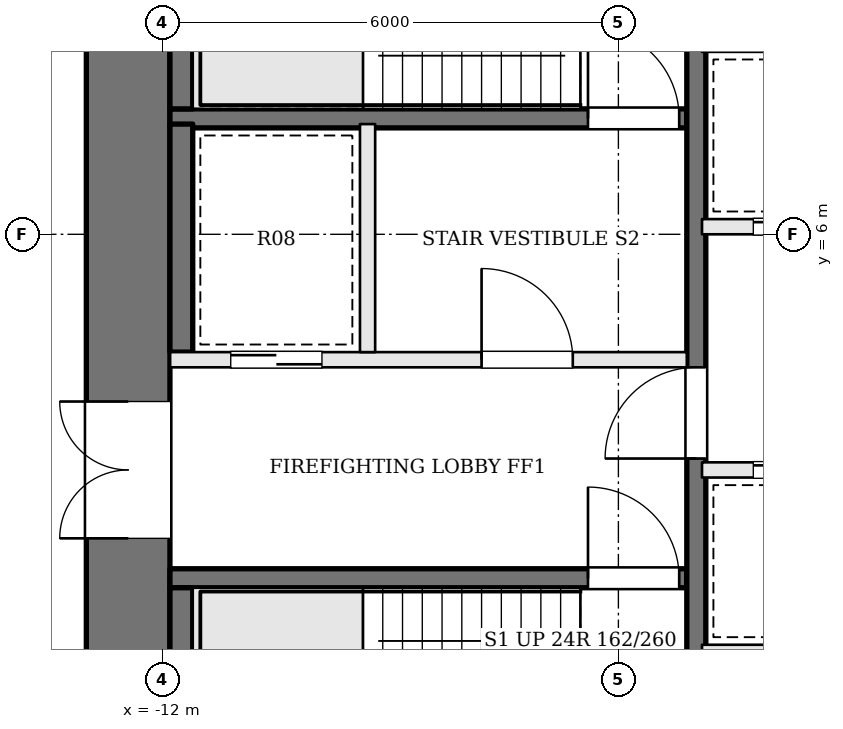
"""IFC4 building model, lengths in metres.
Left out: names, types, materials, properties, quantities, classifications, styles, units other than length and angle.
Written with IfcOpenShell. Run it as: python <this file> out.ifc"""

import sys

from ifc_helpers import new_model, si_unit, direction, frame, frame_2d, origin, place, context, subcontext, project, spatial, rectangle, extrude, element, fill, save


model = new_model("IFC4")
c1 = context("Model", 3, precision=1e-05, world=origin(), true_north=direction((0.0, 1.0)))
c2 = subcontext(c1, "Body", "Model", "MODEL_VIEW")
j1 = project(units=[si_unit("LENGTHUNIT", "METRE"), si_unit("PLANEANGLEUNIT", "RADIAN")], contexts=[c1])
p1 = place(None, origin())
s1 = spatial("IfcSite", under=j1, at=p1, CompositionType="ELEMENT")
p2 = place(p1, origin())
s2 = spatial("IfcBuilding", under=s1, at=p2, CompositionType="ELEMENT")
p3 = place(p2, frame((0.0, 0.0, 134.4)))
s3 = spatial("IfcBuildingStorey", under=s2, at=p3, CompositionType="ELEMENT", Elevation=134.4)
p4 = place(p3, frame((-12.45, -1.9, 0.0), z_axis=(0.0, 0.0, 1.0), x_axis=(0.0, 1.0, 0.0)))
e1 = element("IfcWall", 1, at=p4, inside=s3, PredefinedType="SHEAR", context=c2, shape_type="SweptSolid", body=[
    extrude(rectangle(XDim=12.8, YDim=1.1, at=frame_2d((6.4, 0.0))), origin(), (0.0, 0.0, 1.0), 3.9),
])
p5 = place(p4, frame((3.9, 0.0, 0.0)))
e2 = element("IfcOpeningElement", 2, at=p5, cuts=e1, PredefinedType="OPENING", context=c2, shape_type="SweptSolid", body=[
    extrude(rectangle(XDim=1.8, YDim=2.1, at=frame_2d((0.9, 1.05))), frame((0.0, 0.56, 0.0), z_axis=(0.0, -1.0, 0.0), x_axis=(1.0, 0.0, 0.0)), (0.0, 0.0, 1.0), 1.12),
])
p6 = place(p3, frame((-11.9, 1.475, 0.0), z_axis=(0.0, 0.0, 1.0), x_axis=(1.0, 0.0, 0.0)))
e3 = element("IfcWall", 3, at=p6, inside=s3, PredefinedType="SOLIDWALL", context=c2, shape_type="SweptSolid", body=[
    extrude(rectangle(XDim=6.8, YDim=0.25, at=frame_2d((3.4, 0.0))), origin(), (0.0, 0.0, 1.0), 3.7),
])
p7 = place(p6, frame((5.5, 0.0, 0.0)))
e4 = element("IfcOpeningElement", 4, at=p7, cuts=e3, PredefinedType="OPENING", context=c2, shape_type="SweptSolid", body=[
    extrude(rectangle(XDim=1.2, YDim=2.1, at=frame_2d((0.6, 1.05))), frame((0.0, 0.135, 0.0), z_axis=(0.0, -1.0, 0.0), x_axis=(1.0, 0.0, 0.0)), (0.0, 0.0, 1.0), 0.27),
])
p8 = place(p3, frame((-11.9, 4.35, 0.0), z_axis=(0.0, 0.0, 1.0), x_axis=(1.0, 0.0, 0.0)))
e5 = element("IfcWall", 5, at=p8, inside=s3, PredefinedType="SOLIDWALL", context=c2, shape_type="SweptSolid", body=[
    extrude(rectangle(XDim=6.8, YDim=0.2, at=frame_2d((3.4, 0.0))), origin(), (0.0, 0.0, 1.0), 3.7),
])
p9 = place(p8, frame((4.1, 0.0, 0.0)))
e6 = element("IfcOpeningElement", 6, at=p9, cuts=e5, PredefinedType="OPENING", context=c2, shape_type="SweptSolid", body=[
    extrude(rectangle(XDim=1.2, YDim=2.1, at=frame_2d((0.6, 1.05))), frame((0.0, 0.11, 0.0), z_axis=(0.0, -1.0, 0.0), x_axis=(1.0, 0.0, 0.0)), (0.0, 0.0, 1.0), 0.22),
])
p10 = place(p8, frame((0.8, 0.0, 0.0)))
e7 = element("IfcOpeningElement", 7, at=p10, cuts=e5, PredefinedType="OPENING", context=c2, shape_type="SweptSolid", body=[
    extrude(rectangle(XDim=1.2, YDim=2.1, at=frame_2d((0.6, 1.05))), frame((0.0, 0.11, 0.0), z_axis=(0.0, -1.0, 0.0), x_axis=(1.0, 0.0, 0.0)), (0.0, 0.0, 1.0), 0.22),
])
p11 = place(p3, frame((-11.9, 7.525, 0.0), z_axis=(0.0, 0.0, 1.0), x_axis=(1.0, 0.0, 0.0)))
e8 = element("IfcWall", 8, at=p11, inside=s3, PredefinedType="SOLIDWALL", context=c2, shape_type="SweptSolid", body=[
    extrude(rectangle(XDim=6.8, YDim=0.25, at=frame_2d((3.4, 0.0))), origin(), (0.0, 0.0, 1.0), 3.7),
])
p12 = place(p11, frame((5.5, 0.0, 0.0)))
e9 = element("IfcOpeningElement", 9, at=p12, cuts=e8, PredefinedType="OPENING", context=c2, shape_type="SweptSolid", body=[
    extrude(rectangle(XDim=1.2, YDim=2.1, at=frame_2d((0.6, 1.05))), frame((0.0, 0.135, 0.0), z_axis=(0.0, -1.0, 0.0), x_axis=(1.0, 0.0, 0.0)), (0.0, 0.0, 1.0), 0.27),
])
p13 = place(p3, frame((-9.3, 4.45, 0.0), z_axis=(0.0, 0.0, 1.0), x_axis=(0.0, 1.0, 0.0)))
e10 = element("IfcWall", 10, at=p13, inside=s3, PredefinedType="SOLIDWALL", context=c2, shape_type="SweptSolid", body=[
    extrude(rectangle(XDim=3.0, YDim=0.2, at=frame_2d((1.5, 0.0))), origin(), (0.0, 0.0, 1.0), 3.7),
])
p14 = place(p3, frame((-4.975, -1.9, 0.0), z_axis=(0.0, 0.0, 1.0), x_axis=(0.0, 1.0, 0.0)))
e11 = element("IfcWall", 11, at=p14, inside=s3, PredefinedType="SOLIDWALL", context=c2, shape_type="SweptSolid", body=[
    extrude(rectangle(XDim=12.8, YDim=0.25, at=frame_2d((6.4, 0.0))), origin(), (0.0, 0.0, 1.0), 3.7),
])
p15 = place(p14, frame((4.95, 0.0, 0.0)))
e12 = element("IfcOpeningElement", 12, at=p15, cuts=e11, PredefinedType="OPENING", context=c2, shape_type="SweptSolid", body=[
    extrude(rectangle(XDim=1.2, YDim=2.1, at=frame_2d((0.6, 1.05))), frame((0.0, 0.135, 0.0), z_axis=(0.0, -1.0, 0.0), x_axis=(1.0, 0.0, 0.0)), (0.0, 0.0, 1.0), 0.27),
])
p16 = place(p3, frame((-11.75, -1.6, 0.0), z_axis=(0.0, 0.0, 1.0), x_axis=(0.0, 1.0, 0.0)))
e13 = element("IfcWall", 13, at=p16, inside=s3, PredefinedType="SOLIDWALL", context=c2, shape_type="SweptSolid", body=[
    extrude(rectangle(XDim=2.95, YDim=0.3, at=frame_2d((1.475, 0.0))), origin(), (0.0, 0.0, 1.0), 3.7),
])
p17 = place(p3, frame((-11.75, 4.45, 0.0), z_axis=(0.0, 0.0, 1.0), x_axis=(0.0, 1.0, 0.0)))
e14 = element("IfcWall", 14, at=p17, inside=s3, PredefinedType="SOLIDWALL", context=c2, shape_type="SweptSolid", body=[
    extrude(rectangle(XDim=3.0, YDim=0.3, at=frame_2d((1.5, 0.0))), origin(), (0.0, 0.0, 1.0), 3.7),
])
p18 = place(p3, frame((-11.75, 7.65, 0.0), z_axis=(0.0, 0.0, 1.0), x_axis=(0.0, 1.0, 0.0)))
e15 = element("IfcWall", 15, at=p18, inside=s3, PredefinedType="SOLIDWALL", context=c2, shape_type="SweptSolid", body=[
    extrude(rectangle(XDim=2.95, YDim=0.3, at=frame_2d((1.475, 0.0))), origin(), (0.0, 0.0, 1.0), 3.7),
])
p19 = place(p3, frame((-4.9, 0.5, 0.0), z_axis=(0.0, 0.0, 1.0), x_axis=(1.0, 0.0, 0.0)))
e16 = element("IfcWall", 16, at=p19, inside=s3, PredefinedType="SOLIDWALL", context=c2, shape_type="SweptSolid", body=[
    extrude(rectangle(XDim=9.8, YDim=0.2, at=frame_2d((4.9, 0.0))), origin(), (0.0, 0.0, 1.0), 3.7),
])
p20 = place(p3, frame((-4.9, 2.9, 0.0), z_axis=(0.0, 0.0, 1.0), x_axis=(1.0, 0.0, 0.0)))
e17 = element("IfcWall", 17, at=p20, inside=s3, PredefinedType="SOLIDWALL", context=c2, shape_type="SweptSolid", body=[
    extrude(rectangle(XDim=9.8, YDim=0.2, at=frame_2d((4.9, 0.0))), origin(), (0.0, 0.0, 1.0), 3.7),
])
p21 = place(p20, frame((0.675, 0.0, 0.0)))
e18 = element("IfcOpeningElement", 18, at=p21, cuts=e17, PredefinedType="OPENING", context=c2, shape_type="SweptSolid", body=[
    extrude(rectangle(XDim=1.1, YDim=2.1, at=frame_2d((0.55, 1.05))), frame((0.0, 0.11, 0.0), z_axis=(0.0, -1.0, 0.0), x_axis=(1.0, 0.0, 0.0)), (0.0, 0.0, 1.0), 0.22),
])
p22 = place(p20, frame((2.613, 0.0, 0.0)))
e19 = element("IfcOpeningElement", 19, at=p22, cuts=e17, PredefinedType="OPENING", context=c2, shape_type="SweptSolid", body=[
    extrude(rectangle(XDim=0.9, YDim=2.1, at=frame_2d((0.45, 1.05))), frame((0.0, 0.11, 0.0), z_axis=(0.0, -1.0, 0.0), x_axis=(1.0, 0.0, 0.0)), (0.0, 0.0, 1.0), 0.22),
])
p23 = place(p20, frame((4.35, 0.0, 0.0)))
e20 = element("IfcOpeningElement", 20, at=p23, cuts=e17, PredefinedType="OPENING", context=c2, shape_type="SweptSolid", body=[
    extrude(rectangle(XDim=1.1, YDim=2.1, at=frame_2d((0.55, 1.05))), frame((0.0, 0.11, 0.0), z_axis=(0.0, -1.0, 0.0), x_axis=(1.0, 0.0, 0.0)), (0.0, 0.0, 1.0), 0.22),
])
p24 = place(p20, frame((7.463, 0.0, 0.0)))
e21 = element("IfcOpeningElement", 21, at=p24, cuts=e17, PredefinedType="OPENING", context=c2, shape_type="SweptSolid", body=[
    extrude(rectangle(XDim=1.0, YDim=2.1, at=frame_2d((0.5, 1.05))), frame((0.0, 0.11, 0.0), z_axis=(0.0, -1.0, 0.0), x_axis=(1.0, 0.0, 0.0)), (0.0, 0.0, 1.0), 0.22),
])
p25 = place(p3, frame((-4.9, 6.1, 0.0), z_axis=(0.0, 0.0, 1.0), x_axis=(1.0, 0.0, 0.0)))
e22 = element("IfcWall", 22, at=p25, inside=s3, PredefinedType="SOLIDWALL", context=c2, shape_type="SweptSolid", body=[
    extrude(rectangle(XDim=9.8, YDim=0.2, at=frame_2d((4.9, 0.0))), origin(), (0.0, 0.0, 1.0), 3.7),
])
p26 = place(p25, frame((0.675, 0.0, 0.0)))
e23 = element("IfcOpeningElement", 23, at=p26, cuts=e22, PredefinedType="OPENING", context=c2, shape_type="SweptSolid", body=[
    extrude(rectangle(XDim=1.1, YDim=2.1, at=frame_2d((0.55, 1.05))), frame((0.0, 0.11, 0.0), z_axis=(0.0, -1.0, 0.0), x_axis=(1.0, 0.0, 0.0)), (0.0, 0.0, 1.0), 0.22),
])
p27 = place(p25, frame((3.125, 0.0, 0.0)))
e24 = element("IfcOpeningElement", 24, at=p27, cuts=e22, PredefinedType="OPENING", context=c2, shape_type="SweptSolid", body=[
    extrude(rectangle(XDim=1.1, YDim=2.1, at=frame_2d((0.55, 1.05))), frame((0.0, 0.11, 0.0), z_axis=(0.0, -1.0, 0.0), x_axis=(1.0, 0.0, 0.0)), (0.0, 0.0, 1.0), 0.22),
])
p28 = place(p25, frame((5.575, 0.0, 0.0)))
e25 = element("IfcOpeningElement", 25, at=p28, cuts=e22, PredefinedType="OPENING", context=c2, shape_type="SweptSolid", body=[
    extrude(rectangle(XDim=1.1, YDim=2.1, at=frame_2d((0.55, 1.05))), frame((0.0, 0.11, 0.0), z_axis=(0.0, -1.0, 0.0), x_axis=(1.0, 0.0, 0.0)), (0.0, 0.0, 1.0), 0.22),
])
p29 = place(p25, frame((8.025, 0.0, 0.0)))
e26 = element("IfcOpeningElement", 26, at=p29, cuts=e22, PredefinedType="OPENING", context=c2, shape_type="SweptSolid", body=[
    extrude(rectangle(XDim=1.1, YDim=2.1, at=frame_2d((0.55, 1.05))), frame((0.0, 0.11, 0.0), z_axis=(0.0, -1.0, 0.0), x_axis=(1.0, 0.0, 0.0)), (0.0, 0.0, 1.0), 0.22),
])
p30 = place(p5, origin())
e27 = element("IfcDoor", 27, at=p30, inside=s3, OperationType="DOUBLE_DOOR_SINGLE_SWING", PredefinedType="DOOR", context=c2, shape_type="SweptSolid", body=[
    extrude(rectangle(XDim=1.8, YDim=2.1, at=frame_2d((0.9, 1.05))), frame((0.0, 0.025, 0.0), z_axis=(0.0, -1.0, 0.0), x_axis=(1.0, 0.0, 0.0)), (0.0, 0.0, 1.0), 0.05),
])
fill(e2, e27)
p31 = place(p15, origin())
e28 = element("IfcDoor", 28, at=p31, inside=s3, OperationType="SINGLE_SWING_LEFT", PredefinedType="DOOR", context=c2, shape_type="SweptSolid", body=[
    extrude(rectangle(XDim=1.2, YDim=2.1, at=frame_2d((0.6, 1.05))), frame((0.0, 0.025, 0.0), z_axis=(0.0, -1.0, 0.0), x_axis=(1.0, 0.0, 0.0)), (0.0, 0.0, 1.0), 0.05),
])
fill(e12, e28)
p32 = place(p9, origin())
e29 = element("IfcDoor", 29, at=p32, inside=s3, OperationType="SINGLE_SWING_LEFT", PredefinedType="DOOR", context=c2, shape_type="SweptSolid", body=[
    extrude(rectangle(XDim=1.2, YDim=2.1, at=frame_2d((0.6, 1.05))), frame((0.0, 0.025, 0.0), z_axis=(0.0, -1.0, 0.0), x_axis=(1.0, 0.0, 0.0)), (0.0, 0.0, 1.0), 0.05),
])
fill(e6, e29)
p33 = place(p7, origin())
e30 = element("IfcDoor", 30, at=p33, inside=s3, OperationType="SINGLE_SWING_LEFT", PredefinedType="DOOR", context=c2, shape_type="SweptSolid", body=[
    extrude(rectangle(XDim=1.2, YDim=2.1, at=frame_2d((0.6, 1.05))), frame((0.0, 0.025, 0.0), z_axis=(0.0, -1.0, 0.0), x_axis=(1.0, 0.0, 0.0)), (0.0, 0.0, 1.0), 0.05),
])
fill(e4, e30)
p34 = place(p12, origin())
e31 = element("IfcDoor", 31, at=p34, inside=s3, OperationType="SINGLE_SWING_LEFT", PredefinedType="DOOR", context=c2, shape_type="SweptSolid", body=[
    extrude(rectangle(XDim=1.2, YDim=2.1, at=frame_2d((0.6, 1.05))), frame((0.0, 0.025, 0.0), z_axis=(0.0, -1.0, 0.0), x_axis=(1.0, 0.0, 0.0)), (0.0, 0.0, 1.0), 0.05),
])
fill(e9, e31)
p35 = place(p10, origin())
e32 = element("IfcDoor", 32, at=p35, inside=s3, OperationType="SLIDING_TO_RIGHT", PredefinedType="DOOR", context=c2, shape_type="SweptSolid", body=[
    extrude(rectangle(XDim=1.2, YDim=2.1, at=frame_2d((0.6, 1.05))), frame((0.0, 0.025, 0.0), z_axis=(0.0, -1.0, 0.0), x_axis=(1.0, 0.0, 0.0)), (0.0, 0.0, 1.0), 0.05),
])
fill(e7, e32)
p36 = place(p21, origin())
e33 = element("IfcDoor", 33, at=p36, inside=s3, OperationType="SLIDING_TO_RIGHT", PredefinedType="DOOR", context=c2, shape_type="SweptSolid", body=[
    extrude(rectangle(XDim=1.1, YDim=2.1, at=frame_2d((0.55, 1.05))), frame((0.0, 0.025, 0.0), z_axis=(0.0, -1.0, 0.0), x_axis=(1.0, 0.0, 0.0)), (0.0, 0.0, 1.0), 0.05),
])
fill(e18, e33)
p37 = place(p26, origin())
e34 = element("IfcDoor", 34, at=p37, inside=s3, OperationType="SLIDING_TO_RIGHT", PredefinedType="DOOR", context=c2, shape_type="SweptSolid", body=[
    extrude(rectangle(XDim=1.1, YDim=2.1, at=frame_2d((0.55, 1.05))), frame((0.0, 0.025, 0.0), z_axis=(0.0, -1.0, 0.0), x_axis=(1.0, 0.0, 0.0)), (0.0, 0.0, 1.0), 0.05),
])
fill(e23, e34)
save(model, sys.argv[1])
